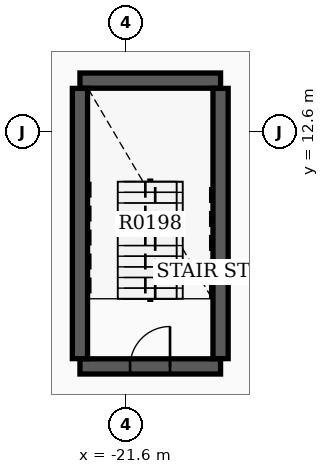
"""IFC4 building model, lengths in metres.
Left out: names, types, materials, properties, quantities, classifications, styles, units other than length and angle.
Written with IfcOpenShell. Run it as: python <this file> out.ifc"""

import sys

from ifc_helpers import new_model, si_unit, direction, frame, frame_2d, origin, place, context, subcontext, project, spatial, rectangle, extrude, element, fill, save


model = new_model("IFC4")
c1 = context("Model", 3, precision=1e-05, world=origin(), true_north=direction((0.0, 1.0)))
c2 = subcontext(c1, "Body", "Model", "MODEL_VIEW")
j1 = project(units=[si_unit("LENGTHUNIT", "METRE"), si_unit("PLANEANGLEUNIT", "RADIAN")], contexts=[c1])
p1 = place(None, origin())
s1 = spatial("IfcSite", under=j1, at=p1, CompositionType="ELEMENT")
p2 = place(p1, origin())
s2 = spatial("IfcBuilding", under=s1, at=p2, CompositionType="ELEMENT")
p3 = place(p2, frame((0.0, 0.0, 14.7)))
s3 = spatial("IfcBuildingStorey", under=s2, at=p3, CompositionType="ELEMENT", Elevation=14.7)
p4 = place(p3, frame((-22.82, 13.95, 0.0), z_axis=(0.0, 0.0, 1.0), x_axis=(1.0, 0.0, 0.0)))
e1 = element("IfcWall", 1, at=p4, inside=s3, PredefinedType="SHEAR", context=c2, shape_type="SweptSolid", body=[
    extrude(rectangle(XDim=3.7, YDim=0.4, at=frame_2d((1.85, 0.0))), origin(), (0.0, 0.0, 1.0), 4.25),
])
p5 = place(p3, frame((-22.82, 6.43, 0.0), z_axis=(0.0, 0.0, 1.0), x_axis=(1.0, 0.0, 0.0)))
e2 = element("IfcWall", 2, at=p5, inside=s3, PredefinedType="SHEAR", context=c2, shape_type="SweptSolid", body=[
    extrude(rectangle(XDim=3.7, YDim=0.4, at=frame_2d((1.85, 0.0))), origin(), (0.0, 0.0, 1.0), 4.25),
])
p6 = place(p5, frame((1.32, 0.0, 0.0)))
e3 = element("IfcOpeningElement", 3, at=p6, cuts=e2, PredefinedType="OPENING", context=c2, shape_type="SweptSolid", body=[
    extrude(rectangle(XDim=1.05, YDim=2.15, at=frame_2d((0.525, 1.075))), frame((0.0, 0.21, 0.0), z_axis=(0.0, -1.0, 0.0), x_axis=(1.0, 0.0, 0.0)), (0.0, 0.0, 1.0), 0.42),
])
for number, where, z_axis, x_axis in (
    (4, (-22.82, 6.635, 0.0), (0.0, 0.0, 1.0), (0.0, 1.0, 0.0)),
    (5, (-19.12, 6.635, 0.0), (0.0, 0.0, 1.0), (0.0, 1.0, 0.0)),
):
    element("IfcWall", number, at=place(p3, frame(where, z_axis=z_axis, x_axis=x_axis)), inside=s3, PredefinedType="SHEAR", context=c2, shape_type="SweptSolid", body=[
        extrude(rectangle(XDim=7.11, YDim=0.4, at=frame_2d((3.555, 0.0))), origin(), (0.0, 0.0, 1.0), 4.25),
    ])
p7 = place(p6, origin())
e6 = element("IfcDoor", 6, at=p7, inside=s3, OperationType="SINGLE_SWING_RIGHT", PredefinedType="DOOR", context=c2, shape_type="SweptSolid", body=[
    extrude(rectangle(XDim=1.05, YDim=2.15, at=frame_2d((0.525, 1.075))), frame((0.0, 0.025, 0.0), z_axis=(0.0, -1.0, 0.0), x_axis=(1.0, 0.0, 0.0)), (0.0, 0.0, 1.0), 0.05),
])
fill(e3, e6)
save(model, sys.argv[1])
